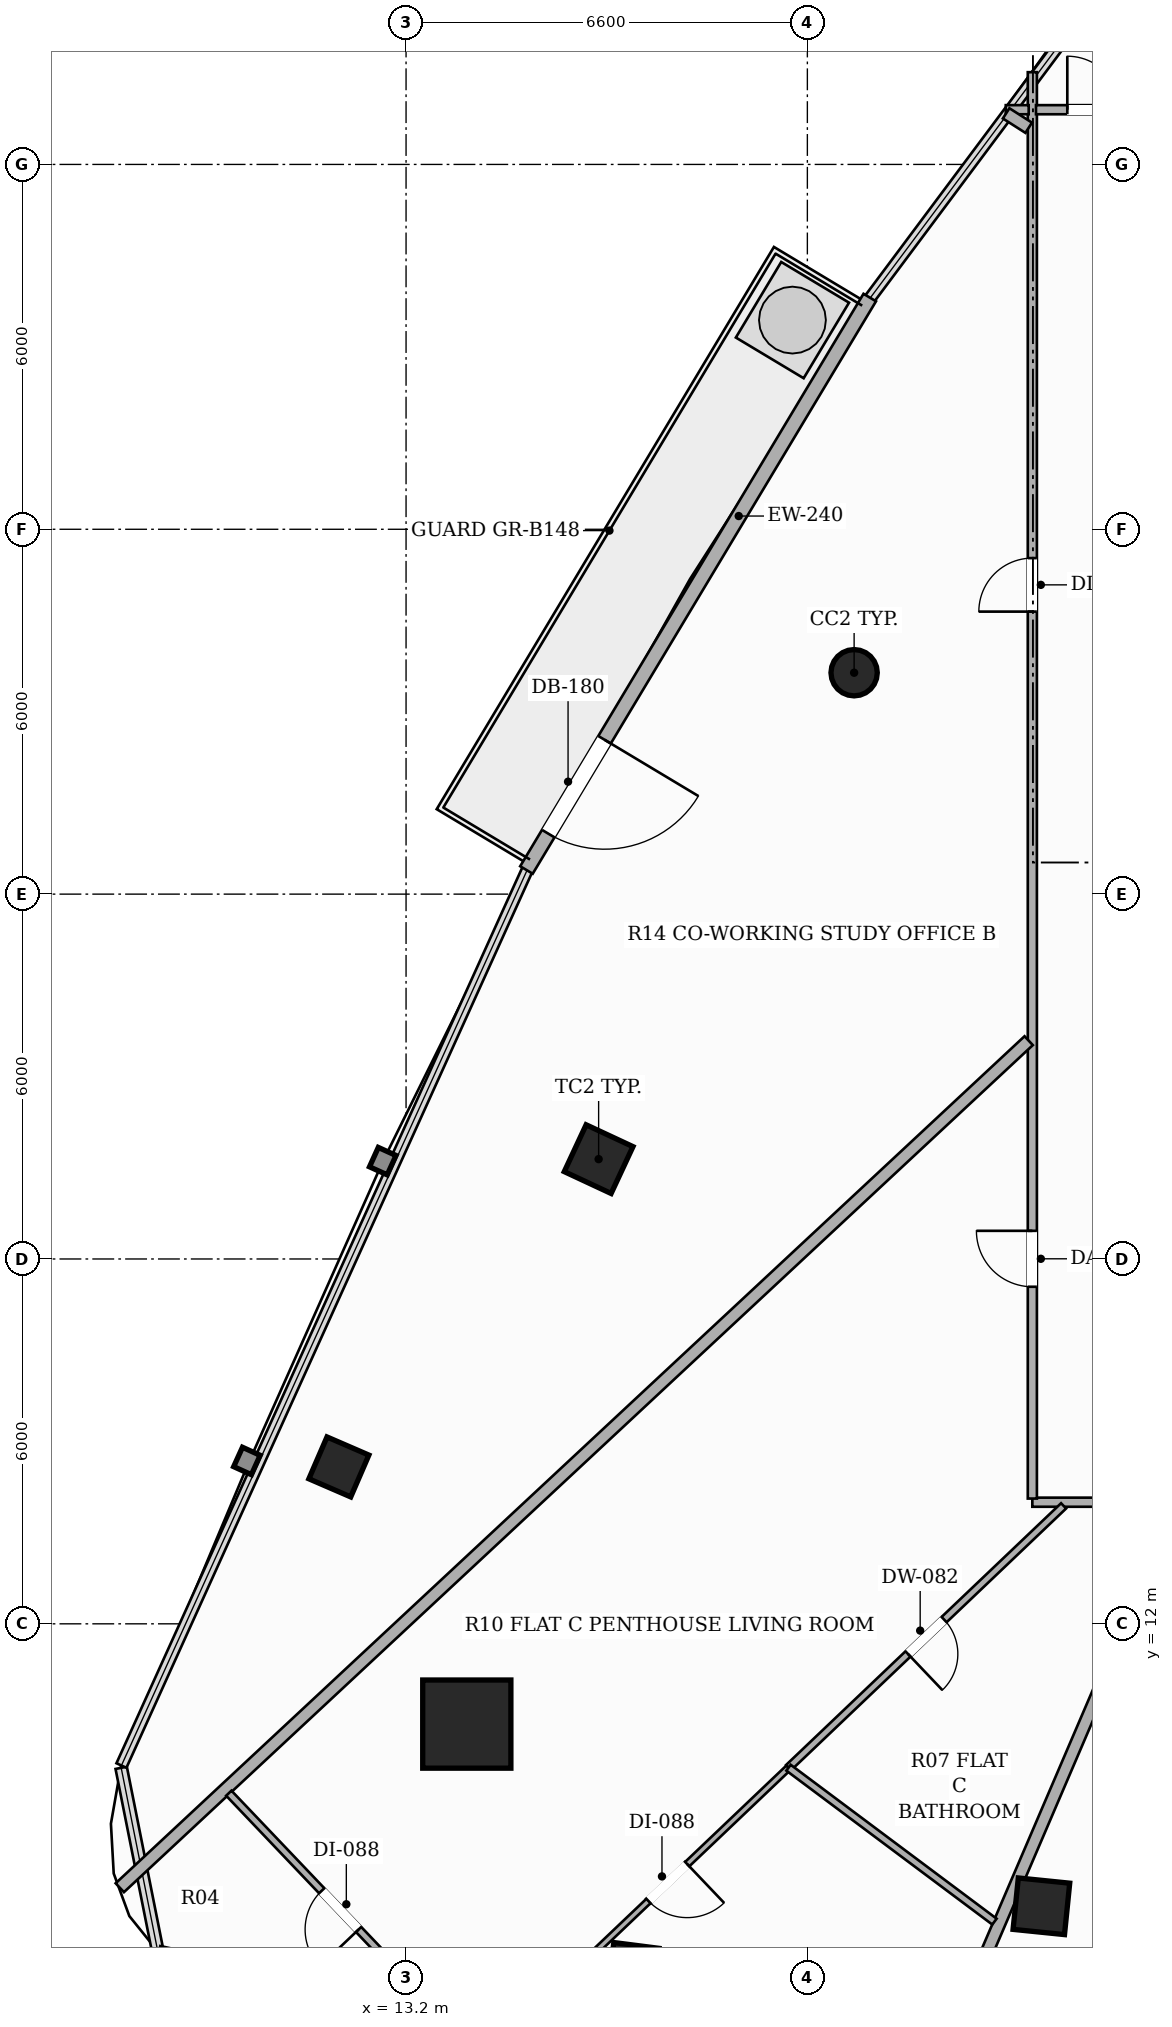
"""IFC4 building model, lengths in metres.
Left out: names, types, materials, properties, quantities, classifications, styles, units other than length and angle.
Written with IfcOpenShell. Run it as: python <this file> out.ifc"""

import sys

from ifc_helpers import new_model, si_unit, direction, frame, frame_2d, origin, origin_2d, place, context, subcontext, project, spatial, rectangle, hollow_rectangle, hollow_circle, extrude, element, fill, save


model = new_model("IFC4")
c1 = context("Model", 3, precision=1e-05, world=origin(), true_north=direction((0.0, 1.0)))
c2 = subcontext(c1, "Body", "Model", "MODEL_VIEW")
j1 = project(units=[si_unit("LENGTHUNIT", "METRE"), si_unit("PLANEANGLEUNIT", "RADIAN")], contexts=[c1])
p1 = place(None, origin())
s1 = spatial("IfcSite", under=j1, at=p1, CompositionType="ELEMENT")
p2 = place(p1, origin())
s2 = spatial("IfcBuilding", under=s1, at=p2, CompositionType="ELEMENT")
p3 = place(p2, frame((0.0, 0.0, 177.05)))
s3 = spatial("IfcBuildingStorey", under=s2, at=p3, CompositionType="ELEMENT", Elevation=177.05)
p4 = place(p3, frame((14.199, 10.351, 0.0), z_axis=(0.0, 0.0, 1.0), x_axis=(1.0, 0.0, 0.0)))
e1 = element("IfcColumn", 1, at=p4, inside=s3, PredefinedType="COLUMN", context=c2, shape_type="SweptSolid", body=[
    extrude(hollow_rectangle(XDim=1.45, YDim=1.45, WallThickness=0.045, at=origin_2d()), origin(), (0.0, 0.0, 1.0), 3.3),
])
p5 = place(p3, frame((20.569, 27.641, 0.0), z_axis=(0.0, 0.0, 1.0), x_axis=(1.0, 0.0, 0.0)))
e2 = element("IfcColumn", 2, at=p5, inside=s3, PredefinedType="COLUMN", context=c2, shape_type="SweptSolid", body=[
    extrude(hollow_circle(Radius=0.381, WallThickness=0.022, at=origin_2d()), origin(), (0.0, 0.0, 1.0), 3.3),
])
for number, where, z_axis, x_axis in (
    (3, (16.367, 19.642, 0.0), (0.0, 0.0, 1.0), (0.423, 0.906, 0.0)),
    (4, (23.649, 7.355, 0.0), (0.0, 0.0, 1.0), (-0.995, 0.101, 0.0)),
):
    element("IfcColumn", number, at=place(p3, frame(where, z_axis=z_axis, x_axis=x_axis)), inside=s3, PredefinedType="COLUMN", context=c2, shape_type="SweptSolid", body=[
        extrude(hollow_rectangle(XDim=0.85, YDim=0.85, WallThickness=0.028, at=origin_2d()), origin(), (0.0, 0.0, 1.0), 3.3),
    ])
for number, where, z_axis, x_axis in (
    (5, (12.095, 14.58, 0.0), (0.0, 0.0, 1.0), (0.397, 0.918, 0.0)),
    (6, (16.941, 6.339, 0.0), (0.0, 0.0, 1.0), (-0.992, 0.127, 0.0)),
):
    element("IfcColumn", number, at=place(p3, frame(where, z_axis=z_axis, x_axis=x_axis)), inside=s3, PredefinedType="COLUMN", context=c2, shape_type="SweptSolid", body=[
        extrude(hollow_rectangle(XDim=0.75, YDim=0.75, WallThickness=0.025, at=origin_2d()), origin(), (0.0, 0.0, 1.0), 3.3),
    ])
p6 = place(p3, frame((20.826, 33.811, 0.0), z_axis=(0.0, 0.0, 1.0), x_axis=(-0.514332213488, -0.857591029669, 0.0)))
e7 = element("IfcWall", 7, at=p6, inside=s3, PredefinedType="SOLIDWALL", context=c2, shape_type="SweptSolid", body=[
    extrude(rectangle(XDim=10.977, YDim=0.24, at=frame_2d((5.489, 0.0))), origin(), (0.0, 0.0, 1.0), 2.624),
])
p7 = place(p6, frame((8.48, 0.0, 0.0)))
e8 = element("IfcOpeningElement", 8, at=p7, cuts=e7, PredefinedType="OPENING", context=c2, shape_type="SweptSolid", body=[
    extrude(rectangle(XDim=1.8, YDim=2.2, at=frame_2d((0.9, 1.1))), frame((0.0, 0.13, 0.0), z_axis=(0.0, -1.0, 0.0), x_axis=(1.0, 0.0, 0.0)), (0.0, 0.0, 1.0), 0.26),
])
p8 = place(p3, frame((26.09, 14.0, 0.0), z_axis=(0.0, 0.0, 1.0), x_axis=(-1.0, 0.0, 0.0)))
e9 = element("IfcWall", 9, at=p8, inside=s3, PredefinedType="PARTITIONING", context=c2, shape_type="SweptSolid", body=[
    extrude(rectangle(XDim=2.59, YDim=0.15, at=frame_2d((1.295, 0.0))), origin(), (0.0, 0.0, 1.0), 2.721),
])
p9 = place(p3, frame((23.5, 14.06, 0.0), z_axis=(0.0, 0.0, 1.0), x_axis=(0.0, 1.0, 0.0)))
e10 = element("IfcWall", 10, at=p9, inside=s3, PredefinedType="PARTITIONING", context=c2, shape_type="SweptSolid", body=[
    extrude(rectangle(XDim=23.457, YDim=0.15, at=frame_2d((11.729, 0.0))), origin(), (0.0, 0.0, 1.0), 2.413),
])
p10 = place(p9, frame((14.586, 0.0, 0.0)))
e11 = element("IfcOpeningElement", 11, at=p10, cuts=e10, PredefinedType="OPENING", context=c2, shape_type="SweptSolid", body=[
    extrude(rectangle(XDim=0.88, YDim=2.1, at=frame_2d((0.44, 1.05))), frame((0.0, 0.085, 0.0), z_axis=(0.0, -1.0, 0.0), x_axis=(1.0, 0.0, 0.0)), (0.0, 0.0, 1.0), 0.17),
])
p11 = place(p9, frame((3.483, 0.0, 0.0)))
e12 = element("IfcOpeningElement", 12, at=p11, cuts=e10, PredefinedType="OPENING", context=c2, shape_type="SweptSolid", body=[
    extrude(rectangle(XDim=0.92, YDim=2.15, at=frame_2d((0.46, 1.075))), frame((0.0, 0.085, 0.0), z_axis=(0.0, -1.0, 0.0), x_axis=(1.0, 0.0, 0.0)), (0.0, 0.0, 1.0), 0.17),
])
p12 = place(p3, frame((23.063, 36.9, 0.0), z_axis=(0.0, 0.0, 1.0), x_axis=(1.0, 0.0, 0.0)))
e13 = element("IfcWall", 13, at=p12, inside=s3, PredefinedType="PARTITIONING", context=c2, shape_type="SweptSolid", body=[
    extrude(rectangle(XDim=0.377, YDim=0.15, at=frame_2d((0.188, 0.0))), origin(), (0.0, 0.0, 1.0), 3.06),
])
p13 = place(p3, frame((23.56, 36.9, 0.0), z_axis=(0.0, 0.0, 1.0), x_axis=(1.0, 0.0, 0.0)))
e14 = element("IfcWall", 14, at=p13, inside=s3, PredefinedType="PARTITIONING", context=c2, shape_type="SweptSolid", body=[
    extrude(rectangle(XDim=2.59, YDim=0.15, at=frame_2d((1.295, 0.0))), origin(), (0.0, 0.0, 1.0), 2.413),
])
p14 = place(p13, frame((0.515, 0.0, 0.0)))
e15 = element("IfcOpeningElement", 15, at=p14, cuts=e14, PredefinedType="OPENING", context=c2, shape_type="SweptSolid", body=[
    extrude(rectangle(XDim=0.88, YDim=2.1, at=frame_2d((0.44, 1.05))), frame((0.0, 0.085, 0.0), z_axis=(0.0, -1.0, 0.0), x_axis=(1.0, 0.0, 0.0)), (0.0, 0.0, 1.0), 0.17),
])
p15 = place(p3, frame((23.44, 21.59, 0.0), z_axis=(0.0, 0.0, 1.0), x_axis=(-0.731574776166, -0.681761209572, 0.0)))
e16 = element("IfcWall", 16, at=p15, inside=s3, PredefinedType="PARTITIONING", context=c2, shape_type="SweptSolid", body=[
    extrude(rectangle(XDim=20.433, YDim=0.2, at=frame_2d((10.216, 0.0))), origin(), (0.0, 0.0, 1.0), 2.413),
])
p16 = place(p3, frame((23.069, 36.84, 0.0), z_axis=(0.0, 0.0, 1.0), x_axis=(0.842563414195, -0.538597152852, 0.0)))
e17 = element("IfcWall", 17, at=p16, inside=s3, PredefinedType="PARTITIONING", context=c2, shape_type="SweptSolid", body=[
    extrude(rectangle(XDim=0.44, YDim=0.2, at=frame_2d((0.22, 0.0))), origin(), (0.0, 0.0, 1.0), 3.06),
])
p17 = place(p3, frame((25.901, 13.94, 0.0), z_axis=(0.0, 0.0, 1.0), x_axis=(-0.394055564824, -0.919086618242, 0.0)))
e18 = element("IfcWall", 18, at=p17, inside=s3, PredefinedType="PARTITIONING", context=c2, shape_type="SweptSolid", body=[
    extrude(rectangle(XDim=10.379, YDim=0.2, at=frame_2d((5.189, 0.0))), origin(), (0.0, 0.0, 1.0), 2.413),
])
p18 = place(p3, frame((24.014, 13.94, 0.0), z_axis=(0.0, 0.0, 1.0), x_axis=(-0.724345202964, -0.68943747138, 0.0)))
e19 = element("IfcWall", 19, at=p18, inside=s3, PredefinedType="PARTITIONING", context=c2, shape_type="SweptSolid", body=[
    extrude(rectangle(XDim=6.246, YDim=0.12, at=frame_2d((3.123, 0.0))), origin(), (0.0, 0.0, 1.0), 2.721),
])
p19 = place(p18, frame((2.713, 0.0, 0.0)))
e20 = element("IfcOpeningElement", 20, at=p19, cuts=e19, PredefinedType="OPENING", context=c2, shape_type="SweptSolid", body=[
    extrude(rectangle(XDim=0.82, YDim=2.1, at=frame_2d((0.41, 1.05))), frame((0.0, 0.07, 0.0), z_axis=(0.0, -1.0, 0.0), x_axis=(1.0, 0.0, 0.0)), (0.0, 0.0, 1.0), 0.14),
])
p20 = place(p3, frame((13.947, 5.369, 0.0), z_axis=(0.0, 0.0, 1.0), x_axis=(-0.689563334415, 0.724225384691, 0.0)))
e21 = element("IfcWall", 21, at=p20, inside=s3, PredefinedType="PARTITIONING", context=c2, shape_type="SweptSolid", body=[
    extrude(rectangle(XDim=5.311, YDim=0.12, at=frame_2d((2.655, 0.0))), origin(), (0.0, 0.0, 1.0), 3.06),
])
p21 = place(p20, frame((2.215, 0.0, 0.0)))
e22 = element("IfcOpeningElement", 22, at=p21, cuts=e21, PredefinedType="OPENING", context=c2, shape_type="SweptSolid", body=[
    extrude(rectangle(XDim=0.88, YDim=2.1, at=frame_2d((0.44, 1.05))), frame((0.0, 0.07, 0.0), z_axis=(0.0, -1.0, 0.0), x_axis=(1.0, 0.0, 0.0)), (0.0, 0.0, 1.0), 0.14),
])
p22 = place(p3, frame((19.49, 9.634, 0.0), z_axis=(0.0, 0.0, 1.0), x_axis=(-0.724311078703, -0.68947332165, 0.0)))
e23 = element("IfcWall", 23, at=p22, inside=s3, PredefinedType="PARTITIONING", context=c2, shape_type="SweptSolid", body=[
    extrude(rectangle(XDim=6.37, YDim=0.1, at=frame_2d((3.185, 0.0))), origin(), (0.0, 0.0, 1.0), 2.413),
])
p23 = place(p22, frame((2.3, 0.0, 0.0)))
e24 = element("IfcOpeningElement", 24, at=p23, cuts=e23, PredefinedType="OPENING", context=c2, shape_type="SweptSolid", body=[
    extrude(rectangle(XDim=0.88, YDim=2.1, at=frame_2d((0.44, 1.05))), frame((0.0, 0.06, 0.0), z_axis=(0.0, -1.0, 0.0), x_axis=(1.0, 0.0, 0.0)), (0.0, 0.0, 1.0), 0.12),
])
p24 = place(p3, frame((22.877, 7.103, 0.0), z_axis=(0.0, 0.0, 1.0), x_axis=(-0.801045056039, 0.598604057951, 0.0)))
e25 = element("IfcWall", 25, at=p24, inside=s3, PredefinedType="PARTITIONING", context=c2, shape_type="SweptSolid", body=[
    extrude(rectangle(XDim=4.228, YDim=0.12, at=frame_2d((2.114, 0.0))), origin(), (0.0, 0.0, 1.0), 2.413),
])
p25 = place(p7, origin())
e26 = element("IfcDoor", 26, at=p25, inside=s3, OperationType="SINGLE_SWING_LEFT", PredefinedType="DOOR", context=c2, shape_type="SweptSolid", body=[
    extrude(rectangle(XDim=1.8, YDim=2.2, at=frame_2d((0.9, 1.1))), frame((0.0, 0.025, 0.0), z_axis=(0.0, -1.0, 0.0), x_axis=(1.0, 0.0, 0.0)), (0.0, 0.0, 1.0), 0.05),
])
fill(e8, e26)
p26 = place(p10, origin())
e27 = element("IfcDoor", 27, at=p26, inside=s3, OperationType="SINGLE_SWING_LEFT", PredefinedType="DOOR", context=c2, shape_type="SweptSolid", body=[
    extrude(rectangle(XDim=0.88, YDim=2.1, at=frame_2d((0.44, 1.05))), frame((0.0, 0.025, 0.0), z_axis=(0.0, -1.0, 0.0), x_axis=(1.0, 0.0, 0.0)), (0.0, 0.0, 1.0), 0.05),
])
fill(e11, e27)
p27 = place(p11, origin())
e28 = element("IfcDoor", 28, at=p27, inside=s3, OperationType="SINGLE_SWING_RIGHT", PredefinedType="DOOR", context=c2, shape_type="SweptSolid", body=[
    extrude(rectangle(XDim=0.92, YDim=2.15, at=frame_2d((0.46, 1.075))), frame((0.0, 0.025, 0.0), z_axis=(0.0, -1.0, 0.0), x_axis=(1.0, 0.0, 0.0)), (0.0, 0.0, 1.0), 0.05),
])
fill(e12, e28)
p28 = place(p19, origin())
e29 = element("IfcDoor", 29, at=p28, inside=s3, OperationType="SINGLE_SWING_RIGHT", PredefinedType="DOOR", context=c2, shape_type="SweptSolid", body=[
    extrude(rectangle(XDim=0.82, YDim=2.1, at=frame_2d((0.41, 1.05))), frame((0.0, 0.025, 0.0), z_axis=(0.0, -1.0, 0.0), x_axis=(1.0, 0.0, 0.0)), (0.0, 0.0, 1.0), 0.05),
])
fill(e20, e29)
p29 = place(p21, origin())
e30 = element("IfcDoor", 30, at=p29, inside=s3, OperationType="SINGLE_SWING_LEFT", PredefinedType="DOOR", context=c2, shape_type="SweptSolid", body=[
    extrude(rectangle(XDim=0.88, YDim=2.1, at=frame_2d((0.44, 1.05))), frame((0.0, 0.025, 0.0), z_axis=(0.0, -1.0, 0.0), x_axis=(1.0, 0.0, 0.0)), (0.0, 0.0, 1.0), 0.05),
])
fill(e22, e30)
p30 = place(p23, origin())
e31 = element("IfcDoor", 31, at=p30, inside=s3, OperationType="SINGLE_SWING_LEFT", PredefinedType="DOOR", context=c2, shape_type="SweptSolid", body=[
    extrude(rectangle(XDim=0.88, YDim=2.1, at=frame_2d((0.44, 1.05))), frame((0.0, 0.025, 0.0), z_axis=(0.0, -1.0, 0.0), x_axis=(1.0, 0.0, 0.0)), (0.0, 0.0, 1.0), 0.05),
])
fill(e24, e31)
p31 = place(p14, origin())
e32 = element("IfcDoor", 32, at=p31, inside=s3, OperationType="SINGLE_SWING_LEFT", PredefinedType="DOOR", context=c2, shape_type="SweptSolid", body=[
    extrude(rectangle(XDim=0.88, YDim=2.1, at=frame_2d((0.44, 1.05))), frame((0.0, 0.025, 0.0), z_axis=(0.0, -1.0, 0.0), x_axis=(1.0, 0.0, 0.0)), (0.0, 0.0, 1.0), 0.05),
])
fill(e15, e32)
save(model, sys.argv[1])
